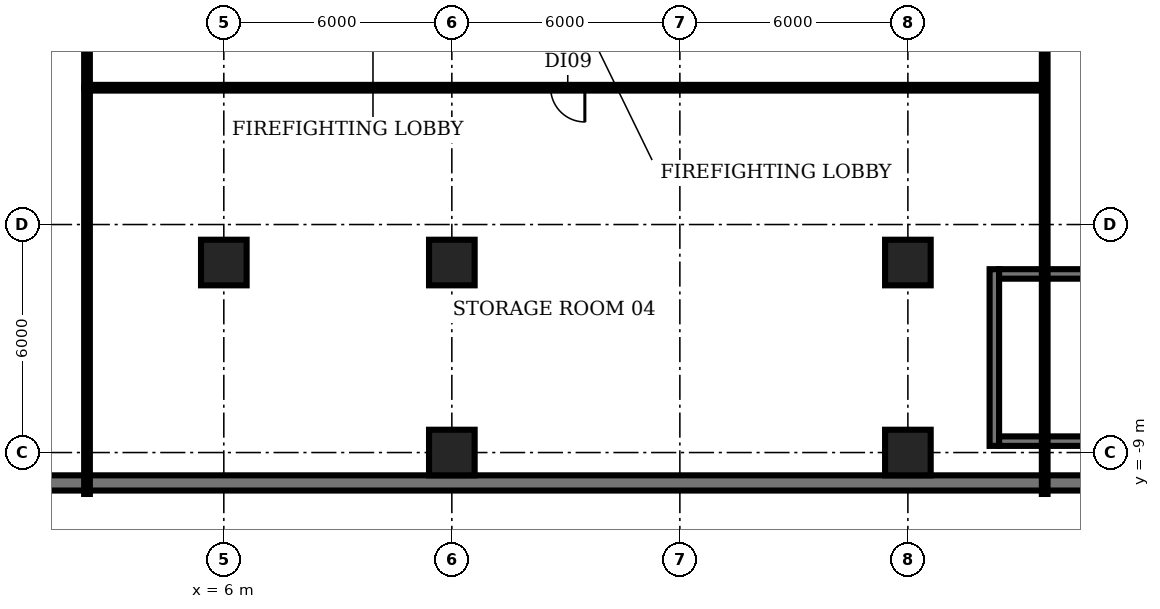
"""IFC4 building model, lengths in metres.
Left out: names, types, materials, properties, quantities, classifications, styles, units other than length and angle.
Written with IfcOpenShell. Run it as: python <this file> out.ifc"""

import sys

from ifc_helpers import new_model, si_unit, direction, frame, frame_2d, origin, origin_2d, place, context, subcontext, project, spatial, rectangle, extrude, element, fill, save


model = new_model("IFC4")
c1 = context("Model", 3, precision=1e-05, world=origin(), true_north=direction((0.0, 1.0)))
c2 = subcontext(c1, "Body", "Model", "MODEL_VIEW")
j1 = project(units=[si_unit("LENGTHUNIT", "METRE"), si_unit("PLANEANGLEUNIT", "RADIAN")], contexts=[c1])
p1 = place(None, origin())
s1 = spatial("IfcSite", under=j1, at=p1, CompositionType="ELEMENT")
p2 = place(p1, origin())
s2 = spatial("IfcBuilding", under=s1, at=p2, CompositionType="ELEMENT")
p3 = place(p2, frame((0.0, 0.0, -6.0)))
s3 = spatial("IfcBuildingStorey", under=s2, at=p3, CompositionType="ELEMENT", Elevation=-6.0)
for number, where, z_axis, x_axis in (
    (1, (6.0, -4.0, -0.3), (0.0, 0.0, 1.0), (1.0, 0.0, 0.0)),
    (2, (12.0, -9.0, -0.3), (0.0, 0.0, 1.0), (1.0, 0.0, 0.0)),
    (3, (12.0, -4.0, -0.3), (0.0, 0.0, 1.0), (1.0, 0.0, 0.0)),
    (4, (24.0, -9.0, -0.3), (0.0, 0.0, 1.0), (1.0, 0.0, 0.0)),
    (5, (24.0, -4.0, -0.3), (0.0, 0.0, 1.0), (1.0, 0.0, 0.0)),
):
    element("IfcColumn", number, at=place(p3, frame(where, z_axis=z_axis, x_axis=x_axis)), inside=s3, PredefinedType="COLUMN", context=c2, shape_type="SweptSolid", body=[
        extrude(rectangle(XDim=1.2, YDim=1.2, at=origin_2d()), origin(), (0.0, 0.0, 1.0), 5.95),
    ])
p4 = place(p3, frame((-0.249, -9.8, 0.0), z_axis=(0.0, 0.0, 1.0), x_axis=(1.0, 0.0, 0.0)))
e6 = element("IfcWall", 6, at=p4, inside=s3, PredefinedType="SOLIDWALL", context=c2, shape_type="SweptSolid", body=[
    extrude(rectangle(XDim=90.497, YDim=0.4, at=frame_2d((45.249, 0.0))), origin(), (0.0, 0.0, 1.0), 5.65),
])
p5 = place(p3, frame((26.275, -8.825, 0.0), z_axis=(0.0, 0.0, 1.0), x_axis=(0.0, 1.0, 0.0)))
e7 = element("IfcWall", 7, at=p5, inside=s3, PredefinedType="SHEAR", context=c2, shape_type="SweptSolid", body=[
    extrude(rectangle(XDim=4.65, YDim=0.25, at=frame_2d((2.325, 0.0))), origin(), (0.0, 0.0, 1.0), 5.65),
])
for number, where, z_axis, x_axis in (
    (8, (34.6, -8.7, 0.0), (0.0, 0.0, 1.0), (-1.0, 0.0, 0.0)),
    (9, (26.4, -4.3, 0.0), (0.0, 0.0, 1.0), (1.0, 0.0, 0.0)),
):
    element("IfcWall", number, at=place(p3, frame(where, z_axis=z_axis, x_axis=x_axis)), inside=s3, PredefinedType="SHEAR", context=c2, shape_type="SweptSolid", body=[
        extrude(rectangle(XDim=8.2, YDim=0.25, at=frame_2d((4.1, 0.0))), origin(), (0.0, 0.0, 1.0), 5.65),
    ])
p6 = place(p3, frame((2.4, -10.09, 0.0), z_axis=(0.0, 0.0, 1.0), x_axis=(0.0, 1.0, 0.0)))
e10 = element("IfcWall", 10, at=p6, inside=s3, PredefinedType="PARTITIONING", context=c2, shape_type="SweptSolid", body=[
    extrude(rectangle(XDim=10.69, YDim=0.15, at=frame_2d((5.345, 0.0))), origin(), (0.0, 0.0, 1.0), 4.7),
])
p7 = place(p3, frame((2.4, 0.6, 0.0), z_axis=(0.0, 0.0, 1.0), x_axis=(0.0, 1.0, 0.0)))
e11 = element("IfcWall", 11, at=p7, inside=s3, PredefinedType="PARTITIONING", context=c2, shape_type="SweptSolid", body=[
    extrude(rectangle(XDim=3.9, YDim=0.15, at=frame_2d((1.95, 0.0))), origin(), (0.0, 0.0, 1.0), 4.7),
])
p8 = place(p3, frame((27.6, -10.09, 0.0), z_axis=(0.0, 0.0, 1.0), x_axis=(0.0, 1.0, 0.0)))
e12 = element("IfcWall", 12, at=p8, inside=s3, PredefinedType="PARTITIONING", context=c2, shape_type="SweptSolid", body=[
    extrude(rectangle(XDim=32.34, YDim=0.15, at=frame_2d((16.17, 0.0))), origin(), (0.0, 0.0, 1.0), 4.7),
])
p9 = place(p3, frame((27.6, 0.6, 0.0), z_axis=(0.0, 0.0, 1.0), x_axis=(-1.0, 0.0, 0.0)))
e13 = element("IfcWall", 13, at=p9, inside=s3, PredefinedType="PARTITIONING", context=c2, shape_type="SweptSolid", body=[
    extrude(rectangle(XDim=25.2, YDim=0.15, at=frame_2d((12.6, 0.0))), origin(), (0.0, 0.0, 1.0), 4.7),
])
p10 = place(p9, frame((12.1, 0.0, 0.0)))
e14 = element("IfcOpeningElement", 14, at=p10, cuts=e13, PredefinedType="OPENING", context=c2, shape_type="SweptSolid", body=[
    extrude(rectangle(XDim=0.9, YDim=2.1, at=frame_2d((0.45, 1.05))), frame((0.0, 0.085, 0.0), z_axis=(0.0, -1.0, 0.0), x_axis=(1.0, 0.0, 0.0)), (0.0, 0.0, 1.0), 0.17),
])
p11 = place(p10, origin())
e15 = element("IfcDoor", 15, at=p11, inside=s3, OperationType="SINGLE_SWING_LEFT", PredefinedType="DOOR", context=c2, shape_type="SweptSolid", body=[
    extrude(rectangle(XDim=0.9, YDim=2.1, at=frame_2d((0.45, 1.05))), frame((0.0, 0.025, 0.0), z_axis=(0.0, -1.0, 0.0), x_axis=(1.0, 0.0, 0.0)), (0.0, 0.0, 1.0), 0.05),
])
fill(e14, e15)
save(model, sys.argv[1])
